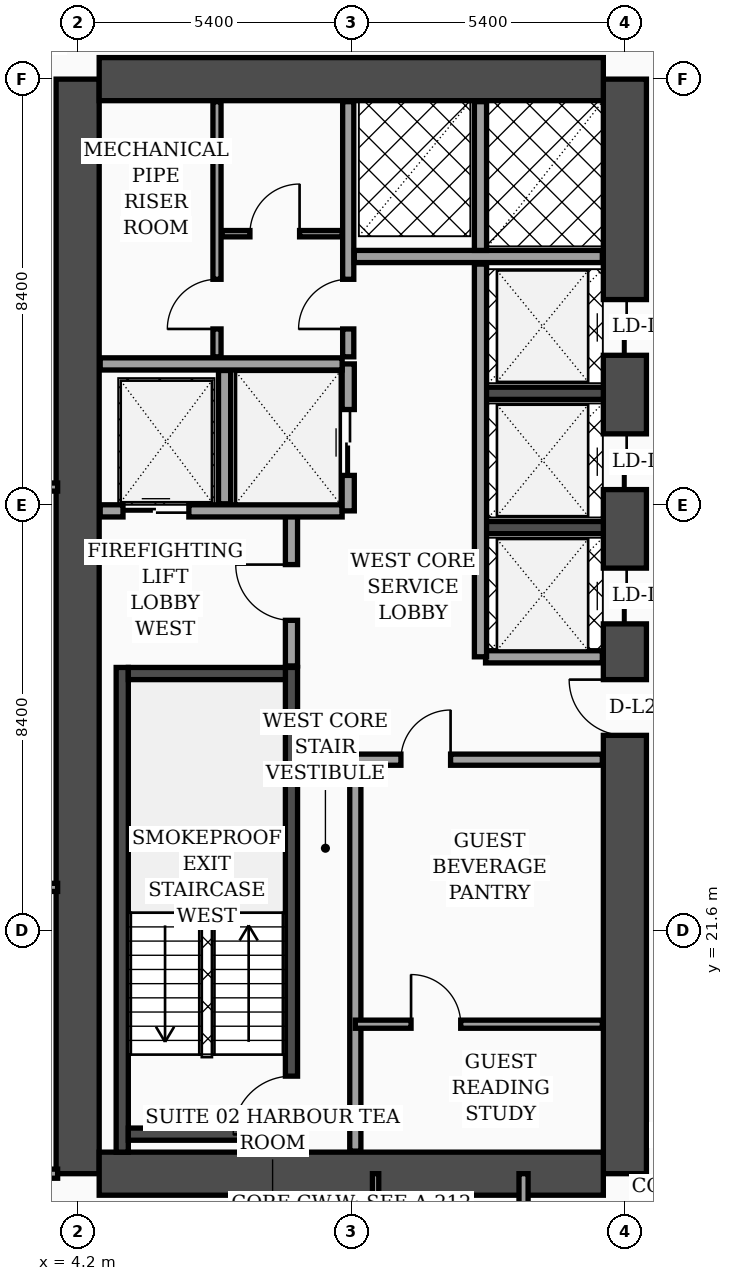
"""IFC4 building model, lengths in metres.
Left out: names, types, materials, properties, quantities, classifications, styles, units other than length and angle.
Written with IfcOpenShell. Run it as: python <this file> out.ifc"""

import sys

from ifc_helpers import new_model, si_unit, direction, frame, frame_2d, origin, place, context, subcontext, project, spatial, rectangle, extrude, element, fill, save


model = new_model("IFC4")
c1 = context("Model", 3, precision=1e-05, world=origin(), true_north=direction((0.0, 1.0)))
c2 = subcontext(c1, "Body", "Model", "MODEL_VIEW")
j1 = project(units=[si_unit("LENGTHUNIT", "METRE"), si_unit("PLANEANGLEUNIT", "RADIAN")], contexts=[c1])
p1 = place(None, origin())
s1 = spatial("IfcSite", under=j1, at=p1, CompositionType="ELEMENT")
p2 = place(p1, origin())
s2 = spatial("IfcBuilding", under=s1, at=p2, CompositionType="ELEMENT")
p3 = place(p2, frame((0.0, 0.0, 120.2)))
s3 = spatial("IfcBuildingStorey", under=s2, at=p3, CompositionType="ELEMENT", Elevation=120.2)
p4 = place(p3, frame((4.2, 16.8, 0.0), z_axis=(0.0, 0.0, 1.0), x_axis=(0.0, 1.0, 0.0)))
e1 = element("IfcWall", 1, at=p4, inside=s3, PredefinedType="SHEAR", context=c2, shape_type="SweptSolid", body=[
    extrude(rectangle(XDim=21.6, YDim=0.85, at=frame_2d((10.8, 0.0))), origin(), (0.0, 0.0, 1.0), 3.56),
])
p5 = place(p3, frame((15.0, 16.8, 0.0), z_axis=(0.0, 0.0, 1.0), x_axis=(0.0, 1.0, 0.0)))
e2 = element("IfcWall", 2, at=p5, inside=s3, PredefinedType="SHEAR", context=c2, shape_type="SweptSolid", body=[
    extrude(rectangle(XDim=21.6, YDim=0.85, at=frame_2d((10.8, 0.0))), origin(), (0.0, 0.0, 1.0), 3.56),
])
p6 = place(p5, frame((8.65, 0.0, 0.0)))
e3 = element("IfcOpeningElement", 3, at=p6, cuts=e2, PredefinedType="OPENING", context=c2, shape_type="SweptSolid", body=[
    extrude(rectangle(XDim=1.1, YDim=2.2, at=frame_2d((0.55, 1.1))), frame((0.0, 0.435, 0.0), z_axis=(0.0, -1.0, 0.0), x_axis=(1.0, 0.0, 0.0)), (0.0, 0.0, 1.0), 0.87),
])
p7 = place(p5, frame((10.85, 0.0, 0.0)))
e4 = element("IfcOpeningElement", 4, at=p7, cuts=e2, PredefinedType="OPENING", context=c2, shape_type="SweptSolid", body=[
    extrude(rectangle(XDim=1.1, YDim=2.2, at=frame_2d((0.55, 1.1))), frame((0.0, 0.435, 0.0), z_axis=(0.0, -1.0, 0.0), x_axis=(1.0, 0.0, 0.0)), (0.0, 0.0, 1.0), 0.87),
])
p8 = place(p5, frame((13.5, 0.0, 0.0)))
e5 = element("IfcOpeningElement", 5, at=p8, cuts=e2, PredefinedType="OPENING", context=c2, shape_type="SweptSolid", body=[
    extrude(rectangle(XDim=1.1, YDim=2.2, at=frame_2d((0.55, 1.1))), frame((0.0, 0.435, 0.0), z_axis=(0.0, -1.0, 0.0), x_axis=(1.0, 0.0, 0.0)), (0.0, 0.0, 1.0), 0.87),
])
p9 = place(p5, frame((16.15, 0.0, 0.0)))
e6 = element("IfcOpeningElement", 6, at=p9, cuts=e2, PredefinedType="OPENING", context=c2, shape_type="SweptSolid", body=[
    extrude(rectangle(XDim=1.1, YDim=2.2, at=frame_2d((0.55, 1.1))), frame((0.0, 0.435, 0.0), z_axis=(0.0, -1.0, 0.0), x_axis=(1.0, 0.0, 0.0)), (0.0, 0.0, 1.0), 0.87),
])
for number, where, z_axis, x_axis in (
    (7, (4.625, 38.4, 0.0), (0.0, 0.0, 1.0), (1.0, 0.0, 0.0)),
    (8, (4.625, 16.8, 0.0), (0.0, 0.0, 1.0), (1.0, 0.0, 0.0)),
):
    element("IfcWall", number, at=place(p3, frame(where, z_axis=z_axis, x_axis=x_axis)), inside=s3, PredefinedType="SHEAR", context=c2, shape_type="SweptSolid", body=[
        extrude(rectangle(XDim=9.95, YDim=0.85, at=frame_2d((4.975, 0.0))), origin(), (0.0, 0.0, 1.0), 3.56),
    ])
p10 = place(p3, frame((5.08, 17.225, 0.0), z_axis=(0.0, 0.0, 1.0), x_axis=(0.0, 1.0, 0.0)))
e9 = element("IfcWall", 9, at=p10, inside=s3, PredefinedType="SOLIDWALL", context=c2, shape_type="SweptSolid", body=[
    extrude(rectangle(XDim=9.565, YDim=0.24, at=frame_2d((4.782, 0.0))), origin(), (0.0, 0.0, 1.0), 3.56),
])
p11 = place(p3, frame((8.42, 17.225, 0.0), z_axis=(0.0, 0.0, 1.0), x_axis=(0.0, 1.0, 0.0)))
e10 = element("IfcWall", 10, at=p11, inside=s3, PredefinedType="SOLIDWALL", context=c2, shape_type="SweptSolid", body=[
    extrude(rectangle(XDim=9.565, YDim=0.24, at=frame_2d((4.782, 0.0))), origin(), (0.0, 0.0, 1.0), 3.56),
])
p12 = place(p11, frame((0.35, 0.0, 0.0)))
e11 = element("IfcOpeningElement", 11, at=p12, cuts=e10, PredefinedType="OPENING", context=c2, shape_type="SweptSolid", body=[
    extrude(rectangle(XDim=1.15, YDim=2.2, at=frame_2d((0.575, 1.1))), frame((0.0, 0.13, 0.0), z_axis=(0.0, -1.0, 0.0), x_axis=(1.0, 0.0, 0.0)), (0.0, 0.0, 1.0), 0.26),
])
for number, where, z_axis, x_axis in (
    (12, (5.2, 17.58, 0.0), (0.0, 0.0, 1.0), (1.0, 0.0, 0.0)),
    (13, (5.2, 26.67, 0.0), (0.0, 0.0, 1.0), (1.0, 0.0, 0.0)),
):
    element("IfcWall", number, at=place(p3, frame(where, z_axis=z_axis, x_axis=x_axis)), inside=s3, PredefinedType="SOLIDWALL", context=c2, shape_type="SweptSolid", body=[
        extrude(rectangle(XDim=3.1, YDim=0.24, at=frame_2d((1.55, 0.0))), origin(), (0.0, 0.0, 1.0), 3.56),
    ])
for number, where, z_axis, x_axis in (
    (14, (12.18, 29.55, 0.0), (0.0, 0.0, 1.0), (1.0, 0.0, 0.0)),
    (15, (12.18, 32.2, 0.0), (0.0, 0.0, 1.0), (1.0, 0.0, 0.0)),
):
    element("IfcWall", number, at=place(p3, frame(where, z_axis=z_axis, x_axis=x_axis)), inside=s3, PredefinedType="SOLIDWALL", context=c2, shape_type="SweptSolid", body=[
        extrude(rectangle(XDim=2.395, YDim=0.24, at=frame_2d((1.198, 0.0))), origin(), (0.0, 0.0, 1.0), 3.56),
    ])
p13 = place(p3, frame((8.42, 26.82, 0.0), z_axis=(0.0, 0.0, 1.0), x_axis=(0.0, 1.0, 0.0)))
e16 = element("IfcWall", 16, at=p13, inside=s3, PredefinedType="SOLIDWALL", context=c2, shape_type="SweptSolid", body=[
    extrude(rectangle(XDim=3.0, YDim=0.24, at=frame_2d((1.5, 0.0))), origin(), (0.0, 0.0, 1.0), 3.56),
])
p14 = place(p13, frame((0.9, 0.0, 0.0)))
e17 = element("IfcOpeningElement", 17, at=p14, cuts=e16, PredefinedType="OPENING", context=c2, shape_type="SweptSolid", body=[
    extrude(rectangle(XDim=1.1, YDim=2.2, at=frame_2d((0.55, 1.1))), frame((0.0, 0.13, 0.0), z_axis=(0.0, -1.0, 0.0), x_axis=(1.0, 0.0, 0.0)), (0.0, 0.0, 1.0), 0.26),
])
p15 = place(p3, frame((4.645, 29.88, 0.0), z_axis=(0.0, 0.0, 1.0), x_axis=(1.0, 0.0, 0.0)))
e18 = element("IfcWall", 18, at=p15, inside=s3, PredefinedType="SOLIDWALL", context=c2, shape_type="SweptSolid", body=[
    extrude(rectangle(XDim=4.775, YDim=0.24, at=frame_2d((2.387, 0.0))), origin(), (0.0, 0.0, 1.0), 3.56),
])
p16 = place(p15, frame((0.45, 0.0, 0.0)))
e19 = element("IfcOpeningElement", 19, at=p16, cuts=e18, PredefinedType="OPENING", context=c2, shape_type="SweptSolid", body=[
    extrude(rectangle(XDim=1.3, YDim=2.35, at=frame_2d((0.65, 1.175))), frame((0.0, 0.13, 0.0), z_axis=(0.0, -1.0, 0.0), x_axis=(1.0, 0.0, 0.0)), (0.0, 0.0, 1.0), 0.26),
])
p17 = place(p3, frame((7.1, 30.02, 0.0), z_axis=(0.0, 0.0, 1.0), x_axis=(0.0, 1.0, 0.0)))
e20 = element("IfcWall", 20, at=p17, inside=s3, PredefinedType="SOLIDWALL", context=c2, shape_type="SweptSolid", body=[
    extrude(rectangle(XDim=2.63, YDim=0.24, at=frame_2d((1.315, 0.0))), origin(), (0.0, 0.0, 1.0), 3.56),
])
p18 = place(p3, frame((9.54, 29.88, 0.0), z_axis=(0.0, 0.0, 1.0), x_axis=(0.0, 1.0, 0.0)))
e21 = element("IfcWall", 21, at=p18, inside=s3, PredefinedType="SOLIDWALL", context=c2, shape_type="SweptSolid", body=[
    extrude(rectangle(XDim=2.9, YDim=0.24, at=frame_2d((1.45, 0.0))), origin(), (0.0, 0.0, 1.0), 3.56),
])
p19 = place(p18, frame((0.7, 0.0, 0.0)))
e22 = element("IfcOpeningElement", 22, at=p19, cuts=e21, PredefinedType="OPENING", context=c2, shape_type="SweptSolid", body=[
    extrude(rectangle(XDim=1.3, YDim=2.35, at=frame_2d((0.65, 1.175))), frame((0.0, 0.13, 0.0), z_axis=(0.0, -1.0, 0.0), x_axis=(1.0, 0.0, 0.0)), (0.0, 0.0, 1.0), 0.26),
])
p20 = place(p3, frame((4.645, 32.78, 0.0), z_axis=(0.0, 0.0, 1.0), x_axis=(1.0, 0.0, 0.0)))
e23 = element("IfcWall", 23, at=p20, inside=s3, PredefinedType="SOLIDWALL", context=c2, shape_type="SweptSolid", body=[
    extrude(rectangle(XDim=4.775, YDim=0.24, at=frame_2d((2.387, 0.0))), origin(), (0.0, 0.0, 1.0), 3.19),
])
p21 = place(p3, frame((9.68, 17.245, 0.0), z_axis=(0.0, 0.0, 1.0), x_axis=(0.0, 1.0, 0.0)))
e24 = element("IfcWall", 24, at=p21, inside=s3, PredefinedType="SOLIDWALL", context=c2, shape_type="SweptSolid", body=[
    extrude(rectangle(XDim=7.755, YDim=0.22, at=frame_2d((3.877, 0.0))), origin(), (0.0, 0.0, 1.0), 3.56),
])
p22 = place(p3, frame((6.95, 32.92, 0.0), z_axis=(0.0, 0.0, 1.0), x_axis=(0.0, 1.0, 0.0)))
e25 = element("IfcWall", 25, at=p22, inside=s3, PredefinedType="PARTITIONING", context=c2, shape_type="SweptSolid", body=[
    extrude(rectangle(XDim=5.035, YDim=0.16, at=frame_2d((2.518, 0.0))), origin(), (0.0, 0.0, 1.0), 3.56),
])
p23 = place(p22, frame((0.55, 0.0, 0.0)))
e26 = element("IfcOpeningElement", 26, at=p23, cuts=e25, PredefinedType="OPENING", context=c2, shape_type="SweptSolid", body=[
    extrude(rectangle(XDim=0.98, YDim=2.15, at=frame_2d((0.49, 1.075))), frame((0.0, 0.09, 0.0), z_axis=(0.0, -1.0, 0.0), x_axis=(1.0, 0.0, 0.0)), (0.0, 0.0, 1.0), 0.18),
])
p24 = place(p3, frame((7.05, 35.35, 0.0), z_axis=(0.0, 0.0, 1.0), x_axis=(1.0, 0.0, 0.0)))
e27 = element("IfcWall", 27, at=p24, inside=s3, PredefinedType="PARTITIONING", context=c2, shape_type="SweptSolid", body=[
    extrude(rectangle(XDim=2.37, YDim=0.125, at=frame_2d((1.185, 0.0))), origin(), (0.0, 0.0, 1.0), 3.56),
])
p25 = place(p24, frame((0.55, 0.0, 0.0)))
e28 = element("IfcOpeningElement", 28, at=p25, cuts=e27, PredefinedType="OPENING", context=c2, shape_type="SweptSolid", body=[
    extrude(rectangle(XDim=0.98, YDim=2.15, at=frame_2d((0.49, 1.075))), frame((0.0, 0.073, 0.0), z_axis=(0.0, -1.0, 0.0), x_axis=(1.0, 0.0, 0.0)), (0.0, 0.0, 1.0), 0.145),
])
p26 = place(p3, frame((9.54, 32.92, 0.0), z_axis=(0.0, 0.0, 1.0), x_axis=(0.0, 1.0, 0.0)))
e29 = element("IfcWall", 29, at=p26, inside=s3, PredefinedType="SOLIDWALL", context=c2, shape_type="SweptSolid", body=[
    extrude(rectangle(XDim=5.035, YDim=0.22, at=frame_2d((2.518, 0.0))), origin(), (0.0, 0.0, 1.0), 3.56),
])
p27 = place(p26, frame((0.55, 0.0, 0.0)))
e30 = element("IfcOpeningElement", 30, at=p27, cuts=e29, PredefinedType="OPENING", context=c2, shape_type="SweptSolid", body=[
    extrude(rectangle(XDim=0.98, YDim=2.15, at=frame_2d((0.49, 1.075))), frame((0.0, 0.12, 0.0), z_axis=(0.0, -1.0, 0.0), x_axis=(1.0, 0.0, 0.0)), (0.0, 0.0, 1.0), 0.24),
])
p28 = place(p3, frame((9.68, 19.75, 0.0), z_axis=(0.0, 0.0, 1.0), x_axis=(1.0, 0.0, 0.0)))
e31 = element("IfcWall", 31, at=p28, inside=s3, PredefinedType="PARTITIONING", context=c2, shape_type="SweptSolid", body=[
    extrude(rectangle(XDim=4.875, YDim=0.16, at=frame_2d((2.438, 0.0))), origin(), (0.0, 0.0, 1.0), 3.56),
])
p29 = place(p28, frame((1.1, 0.0, 0.0)))
e32 = element("IfcOpeningElement", 32, at=p29, cuts=e31, PredefinedType="OPENING", context=c2, shape_type="SweptSolid", body=[
    extrude(rectangle(XDim=0.98, YDim=2.15, at=frame_2d((0.49, 1.075))), frame((0.0, 0.09, 0.0), z_axis=(0.0, -1.0, 0.0), x_axis=(1.0, 0.0, 0.0)), (0.0, 0.0, 1.0), 0.18),
])
p30 = place(p3, frame((9.68, 24.97, 0.0), z_axis=(0.0, 0.0, 1.0), x_axis=(1.0, 0.0, 0.0)))
e33 = element("IfcWall", 33, at=p30, inside=s3, PredefinedType="SOLIDWALL", context=c2, shape_type="SweptSolid", body=[
    extrude(rectangle(XDim=4.875, YDim=0.22, at=frame_2d((2.438, 0.0))), origin(), (0.0, 0.0, 1.0), 2.84),
])
p31 = place(p30, frame((0.9, 0.0, 0.0)))
e34 = element("IfcOpeningElement", 34, at=p31, cuts=e33, PredefinedType="OPENING", context=c2, shape_type="SweptSolid", body=[
    extrude(rectangle(XDim=0.98, YDim=2.15, at=frame_2d((0.49, 1.075))), frame((0.0, 0.12, 0.0), z_axis=(0.0, -1.0, 0.0), x_axis=(1.0, 0.0, 0.0)), (0.0, 0.0, 1.0), 0.24),
])
p32 = place(p3, frame((12.25, 27.0, 0.0), z_axis=(0.0, 0.0, 1.0), x_axis=(1.0, 0.0, 0.0)))
e35 = element("IfcWall", 35, at=p32, inside=s3, PredefinedType="SOLIDWALL", context=c2, shape_type="SweptSolid", body=[
    extrude(rectangle(XDim=2.305, YDim=0.24, at=frame_2d((1.152, 0.0))), origin(), (0.0, 0.0, 1.0), 3.56),
])
p33 = place(p3, frame((12.15, 27.0, 0.0), z_axis=(0.0, 0.0, 1.0), x_axis=(0.0, 1.0, 0.0)))
e36 = element("IfcWall", 36, at=p33, inside=s3, PredefinedType="SOLIDWALL", context=c2, shape_type="SweptSolid", body=[
    extrude(rectangle(XDim=7.75, YDim=0.24, at=frame_2d((3.875, 0.0))), origin(), (0.0, 0.0, 1.0), 3.56),
])
p34 = place(p3, frame((9.66, 34.9, 0.0), z_axis=(0.0, 0.0, 1.0), x_axis=(1.0, 0.0, 0.0)))
e37 = element("IfcWall", 37, at=p34, inside=s3, PredefinedType="SOLIDWALL", context=c2, shape_type="SweptSolid", body=[
    extrude(rectangle(XDim=4.895, YDim=0.24, at=frame_2d((2.448, 0.0))), origin(), (0.0, 0.0, 1.0), 3.56),
])
p35 = place(p3, frame((12.15, 35.02, 0.0), z_axis=(0.0, 0.0, 1.0), x_axis=(0.0, 1.0, 0.0)))
e38 = element("IfcWall", 38, at=p35, inside=s3, PredefinedType="SOLIDWALL", context=c2, shape_type="SweptSolid", body=[
    extrude(rectangle(XDim=2.935, YDim=0.24, at=frame_2d((1.468, 0.0))), origin(), (0.0, 0.0, 1.0), 3.56),
])
p36 = place(p3, frame((0.08, 22.45, 0.0), z_axis=(0.0, 0.0, 1.0), x_axis=(1.0, 0.0, 0.0)))
e39 = element("IfcWall", 39, at=p36, inside=s3, PredefinedType="PARTITIONING", context=c2, shape_type="SweptSolid", body=[
    extrude(rectangle(XDim=3.725, YDim=0.16, at=frame_2d((1.862, 0.0))), origin(), (0.0, 0.0, 1.0), 3.04),
])
p37 = place(p36, frame((1.35, 0.0, 0.0)))
e40 = element("IfcOpeningElement", 40, at=p37, cuts=e39, PredefinedType="OPENING", context=c2, shape_type="SweptSolid", body=[
    extrude(rectangle(XDim=0.96, YDim=2.2, at=frame_2d((0.48, 1.1))), frame((0.0, 0.09, 0.0), z_axis=(0.0, -1.0, 0.0), x_axis=(1.0, 0.0, 0.0)), (0.0, 0.0, 1.0), 0.18),
])
p38 = place(p3, frame((0.08, 30.35, 0.0), z_axis=(0.0, 0.0, 1.0), x_axis=(1.0, 0.0, 0.0)))
e41 = element("IfcWall", 41, at=p38, inside=s3, PredefinedType="PARTITIONING", context=c2, shape_type="SweptSolid", body=[
    extrude(rectangle(XDim=3.725, YDim=0.16, at=frame_2d((1.862, 0.0))), origin(), (0.0, 0.0, 1.0), 3.04),
])
p39 = place(p38, frame((1.35, 0.0, 0.0)))
e42 = element("IfcOpeningElement", 42, at=p39, cuts=e41, PredefinedType="OPENING", context=c2, shape_type="SweptSolid", body=[
    extrude(rectangle(XDim=0.96, YDim=2.2, at=frame_2d((0.48, 1.1))), frame((0.0, 0.09, 0.0), z_axis=(0.0, -1.0, 0.0), x_axis=(1.0, 0.0, 0.0)), (0.0, 0.0, 1.0), 0.18),
])
p40 = place(p3, frame((0.08, 16.8, 0.0), z_axis=(0.0, 0.0, 1.0), x_axis=(1.0, 0.0, 0.0)))
e43 = element("IfcWall", 43, at=p40, inside=s3, PredefinedType="PARTITIONING", context=c2, shape_type="SweptSolid", body=[
    extrude(rectangle(XDim=3.725, YDim=0.18, at=frame_2d((1.862, 0.0))), origin(), (0.0, 0.0, 1.0), 2.84),
])
p41 = place(p3, frame((10.08, 14.75, 0.0), z_axis=(0.0, 0.0, 1.0), x_axis=(0.0, 1.0, 0.0)))
e44 = element("IfcWall", 44, at=p41, inside=s3, PredefinedType="PARTITIONING", context=c2, shape_type="SweptSolid", body=[
    extrude(rectangle(XDim=2.05, YDim=0.125, at=frame_2d((1.025, 0.0))), origin(), (0.0, 0.0, 1.0), 3.56),
])
p42 = place(p3, frame((13.0, 2.44, 0.0), z_axis=(0.0, 0.0, 1.0), x_axis=(0.0, 1.0, 0.0)))
e45 = element("IfcWall", 45, at=p42, inside=s3, PredefinedType="PARTITIONING", context=c2, shape_type="SweptSolid", body=[
    extrude(rectangle(XDim=14.36, YDim=0.18, at=frame_2d((7.18, 0.0))), origin(), (0.0, 0.0, 1.0), 2.84),
])
p43 = place(p42, frame((3.01, 0.0, 0.0)))
e46 = element("IfcOpeningElement", 46, at=p43, cuts=e45, PredefinedType="OPENING", context=c2, shape_type="SweptSolid", body=[
    extrude(rectangle(XDim=1.02, YDim=2.2, at=frame_2d((0.51, 1.1))), frame((0.0, 0.1, 0.0), z_axis=(0.0, -1.0, 0.0), x_axis=(1.0, 0.0, 0.0)), (0.0, 0.0, 1.0), 0.2),
])
p44 = place(p42, frame((9.35, 0.0, 0.0)))
e47 = element("IfcOpeningElement", 47, at=p44, cuts=e45, PredefinedType="OPENING", context=c2, shape_type="SweptSolid", body=[
    extrude(rectangle(XDim=1.02, YDim=2.2, at=frame_2d((0.51, 1.1))), frame((0.0, 0.1, 0.0), z_axis=(0.0, -1.0, 0.0), x_axis=(1.0, 0.0, 0.0)), (0.0, 0.0, 1.0), 0.2),
])
p45 = place(p14, origin())
e48 = element("IfcDoor", 48, at=p45, inside=s3, OperationType="SINGLE_SWING_RIGHT", PredefinedType="DOOR", context=c2, shape_type="SweptSolid", body=[
    extrude(rectangle(XDim=1.1, YDim=2.2, at=frame_2d((0.55, 1.1))), frame((0.0, 0.025, 0.0), z_axis=(0.0, -1.0, 0.0), x_axis=(1.0, 0.0, 0.0)), (0.0, 0.0, 1.0), 0.05),
])
fill(e17, e48)
p46 = place(p16, origin())
e49 = element("IfcDoor", 49, at=p46, inside=s3, OperationType="DOUBLE_DOOR_SLIDING", PredefinedType="DOOR", context=c2, shape_type="SweptSolid", body=[
    extrude(rectangle(XDim=1.3, YDim=2.35, at=frame_2d((0.65, 1.175))), frame((0.0, 0.025, 0.0), z_axis=(0.0, -1.0, 0.0), x_axis=(1.0, 0.0, 0.0)), (0.0, 0.0, 1.0), 0.05),
])
fill(e19, e49)
p47 = place(p19, origin())
e50 = element("IfcDoor", 50, at=p47, inside=s3, OperationType="DOUBLE_DOOR_SLIDING", PredefinedType="DOOR", context=c2, shape_type="SweptSolid", body=[
    extrude(rectangle(XDim=1.3, YDim=2.35, at=frame_2d((0.65, 1.175))), frame((0.0, 0.025, 0.0), z_axis=(0.0, -1.0, 0.0), x_axis=(1.0, 0.0, 0.0)), (0.0, 0.0, 1.0), 0.05),
])
fill(e22, e50)
p48 = place(p23, origin())
e51 = element("IfcDoor", 51, at=p48, inside=s3, OperationType="SINGLE_SWING_LEFT", PredefinedType="DOOR", context=c2, shape_type="SweptSolid", body=[
    extrude(rectangle(XDim=0.98, YDim=2.15, at=frame_2d((0.49, 1.075))), frame((0.0, 0.025, 0.0), z_axis=(0.0, -1.0, 0.0), x_axis=(1.0, 0.0, 0.0)), (0.0, 0.0, 1.0), 0.05),
])
fill(e26, e51)
p49 = place(p25, origin())
e52 = element("IfcDoor", 52, at=p49, inside=s3, OperationType="SINGLE_SWING_RIGHT", PredefinedType="DOOR", context=c2, shape_type="SweptSolid", body=[
    extrude(rectangle(XDim=0.98, YDim=2.15, at=frame_2d((0.49, 1.075))), frame((0.0, 0.025, 0.0), z_axis=(0.0, -1.0, 0.0), x_axis=(1.0, 0.0, 0.0)), (0.0, 0.0, 1.0), 0.05),
])
fill(e28, e52)
p50 = place(p27, origin())
e53 = element("IfcDoor", 53, at=p50, inside=s3, OperationType="SINGLE_SWING_LEFT", PredefinedType="DOOR", context=c2, shape_type="SweptSolid", body=[
    extrude(rectangle(XDim=0.98, YDim=2.15, at=frame_2d((0.49, 1.075))), frame((0.0, 0.025, 0.0), z_axis=(0.0, -1.0, 0.0), x_axis=(1.0, 0.0, 0.0)), (0.0, 0.0, 1.0), 0.05),
])
fill(e30, e53)
p51 = place(p29, origin())
e54 = element("IfcDoor", 54, at=p51, inside=s3, OperationType="SINGLE_SWING_LEFT", PredefinedType="DOOR", context=c2, shape_type="SweptSolid", body=[
    extrude(rectangle(XDim=0.98, YDim=2.15, at=frame_2d((0.49, 1.075))), frame((0.0, 0.025, 0.0), z_axis=(0.0, -1.0, 0.0), x_axis=(1.0, 0.0, 0.0)), (0.0, 0.0, 1.0), 0.05),
])
fill(e32, e54)
p52 = place(p31, origin())
e55 = element("IfcDoor", 55, at=p52, inside=s3, OperationType="SINGLE_SWING_RIGHT", PredefinedType="DOOR", context=c2, shape_type="SweptSolid", body=[
    extrude(rectangle(XDim=0.98, YDim=2.15, at=frame_2d((0.49, 1.075))), frame((0.0, 0.025, 0.0), z_axis=(0.0, -1.0, 0.0), x_axis=(1.0, 0.0, 0.0)), (0.0, 0.0, 1.0), 0.05),
])
fill(e34, e55)
p53 = place(p12, origin())
e56 = element("IfcDoor", 56, at=p53, inside=s3, OperationType="SINGLE_SWING_LEFT", PredefinedType="DOOR", context=c2, shape_type="SweptSolid", body=[
    extrude(rectangle(XDim=1.15, YDim=2.2, at=frame_2d((0.575, 1.1))), frame((0.0, 0.025, 0.0), z_axis=(0.0, -1.0, 0.0), x_axis=(1.0, 0.0, 0.0)), (0.0, 0.0, 1.0), 0.05),
])
fill(e11, e56)
p54 = place(p6, origin())
e57 = element("IfcDoor", 57, at=p54, inside=s3, OperationType="SINGLE_SWING_RIGHT", PredefinedType="DOOR", context=c2, shape_type="SweptSolid", body=[
    extrude(rectangle(XDim=1.1, YDim=2.2, at=frame_2d((0.55, 1.1))), frame((0.0, 0.025, 0.0), z_axis=(0.0, -1.0, 0.0), x_axis=(1.0, 0.0, 0.0)), (0.0, 0.0, 1.0), 0.05),
])
fill(e3, e57)
p55 = place(p7, origin())
e58 = element("IfcDoor", 58, at=p55, inside=s3, OperationType="DOUBLE_DOOR_SLIDING", PredefinedType="DOOR", context=c2, shape_type="SweptSolid", body=[
    extrude(rectangle(XDim=1.1, YDim=2.2, at=frame_2d((0.55, 1.1))), frame((0.0, 0.025, 0.0), z_axis=(0.0, -1.0, 0.0), x_axis=(1.0, 0.0, 0.0)), (0.0, 0.0, 1.0), 0.05),
])
fill(e4, e58)
p56 = place(p8, origin())
e59 = element("IfcDoor", 59, at=p56, inside=s3, OperationType="DOUBLE_DOOR_SLIDING", PredefinedType="DOOR", context=c2, shape_type="SweptSolid", body=[
    extrude(rectangle(XDim=1.1, YDim=2.2, at=frame_2d((0.55, 1.1))), frame((0.0, 0.025, 0.0), z_axis=(0.0, -1.0, 0.0), x_axis=(1.0, 0.0, 0.0)), (0.0, 0.0, 1.0), 0.05),
])
fill(e5, e59)
p57 = place(p9, origin())
e60 = element("IfcDoor", 60, at=p57, inside=s3, OperationType="DOUBLE_DOOR_SLIDING", PredefinedType="DOOR", context=c2, shape_type="SweptSolid", body=[
    extrude(rectangle(XDim=1.1, YDim=2.2, at=frame_2d((0.55, 1.1))), frame((0.0, 0.025, 0.0), z_axis=(0.0, -1.0, 0.0), x_axis=(1.0, 0.0, 0.0)), (0.0, 0.0, 1.0), 0.05),
])
fill(e6, e60)
save(model, sys.argv[1])
